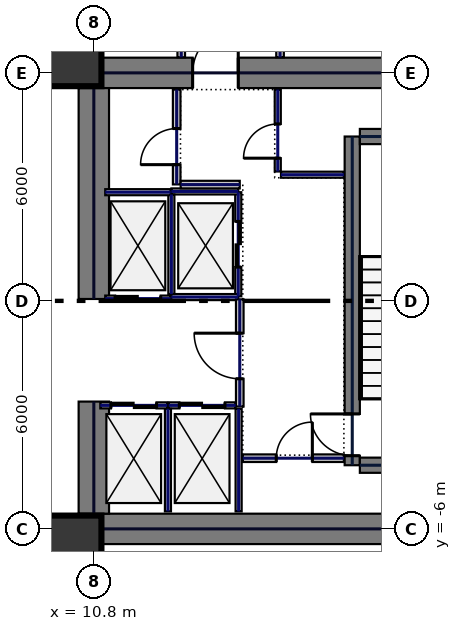
"""IFC4 building model, lengths in metres.
Left out: names, types, materials, properties, quantities, classifications, styles, units other than length and angle.
Written with IfcOpenShell. Run it as: python <this file> out.ifc"""

import sys

from ifc_helpers import new_model, si_unit, direction, frame, frame_2d, origin, origin_2d, place, context, subcontext, project, spatial, rectangle, hollow_circle, extrude, element, fill, save


model = new_model("IFC4")
c1 = context("Model", 3, precision=1e-05, world=origin(), true_north=direction((0.0, 1.0)))
c2 = subcontext(c1, "Body", "Model", "MODEL_VIEW")
j1 = project(units=[si_unit("LENGTHUNIT", "METRE"), si_unit("PLANEANGLEUNIT", "RADIAN")], contexts=[c1])
p1 = place(None, origin())
s1 = spatial("IfcSite", under=j1, at=p1, CompositionType="ELEMENT")
p2 = place(p1, origin())
s2 = spatial("IfcBuilding", under=s1, at=p2, CompositionType="ELEMENT")
p3 = place(p2, origin())
s3 = spatial("IfcBuildingStorey", under=s2, at=p3, CompositionType="ELEMENT", Elevation=0.0)
p4 = place(p3, frame((10.4, 6.0, 0.0), z_axis=(0.0, 0.0, 1.0), x_axis=(1.0, 0.0, 0.0)))
e1 = element("IfcWall", 1, at=p4, inside=s3, PredefinedType="SHEAR", context=c2, shape_type="SweptSolid", body=[
    extrude(rectangle(XDim=11.6, YDim=0.8, at=frame_2d((5.8, 0.0))), origin(), (0.0, 0.0, 1.0), 8.1),
])
p5 = place(p4, frame((3.0, 0.0, 0.0)))
e2 = element("IfcOpeningElement", 2, at=p5, cuts=e1, PredefinedType="OPENING", context=c2, shape_type="SweptSolid", body=[
    extrude(rectangle(XDim=1.2, YDim=2.2, at=frame_2d((0.6, 1.1))), frame((0.0, 0.41, 0.0), z_axis=(0.0, -1.0, 0.0), x_axis=(1.0, 0.0, 0.0)), (0.0, 0.0, 1.0), 0.82),
])
p6 = place(p3, frame((10.4, -6.0, 0.0), z_axis=(0.0, 0.0, 1.0), x_axis=(1.0, 0.0, 0.0)))
e3 = element("IfcWall", 3, at=p6, inside=s3, PredefinedType="SHEAR", context=c2, shape_type="SweptSolid", body=[
    extrude(rectangle(XDim=11.6, YDim=0.8, at=frame_2d((5.8, 0.0))), origin(), (0.0, 0.0, 1.0), 8.1),
])
p7 = place(p3, frame((10.8, -5.6, 0.0), z_axis=(0.0, 0.0, 1.0), x_axis=(0.0, 1.0, 0.0)))
e4 = element("IfcWall", 4, at=p7, inside=s3, PredefinedType="SHEAR", context=c2, shape_type="SweptSolid", body=[
    extrude(rectangle(XDim=2.95, YDim=0.8, at=frame_2d((1.475, 0.0))), origin(), (0.0, 0.0, 1.0), 8.1),
])
p8 = place(p3, frame((10.8, 0.05, 0.0), z_axis=(0.0, 0.0, 1.0), x_axis=(0.0, 1.0, 0.0)))
e5 = element("IfcWall", 5, at=p8, inside=s3, PredefinedType="SHEAR", context=c2, shape_type="SweptSolid", body=[
    extrude(rectangle(XDim=5.55, YDim=0.8, at=frame_2d((2.775, 0.0))), origin(), (0.0, 0.0, 1.0), 8.1),
])
p9 = place(p3, frame((17.6, -4.325, 0.0), z_axis=(0.0, 0.0, 1.0), x_axis=(0.0, 1.0, 0.0)))
e6 = element("IfcWall", 6, at=p9, inside=s3, PredefinedType="SHEAR", context=c2, shape_type="SweptSolid", body=[
    extrude(rectangle(XDim=8.65, YDim=0.4, at=frame_2d((4.325, 0.0))), origin(), (0.0, 0.0, 1.0), 8.1),
])
p10 = place(p9, frame((0.25, 0.0, 0.0)))
e7 = element("IfcOpeningElement", 7, at=p10, cuts=e6, PredefinedType="OPENING", context=c2, shape_type="SweptSolid", body=[
    extrude(rectangle(XDim=1.1, YDim=2.2, at=frame_2d((0.55, 1.1))), frame((0.0, 0.21, 0.0), z_axis=(0.0, -1.0, 0.0), x_axis=(1.0, 0.0, 0.0)), (0.0, 0.0, 1.0), 0.42),
])
for number, where, z_axis, x_axis in (
    (8, (17.8, -4.325, 0.0), (0.0, 0.0, 1.0), (1.0, 0.0, 0.0)),
    (9, (17.8, 4.325, 0.0), (0.0, 0.0, 1.0), (1.0, 0.0, 0.0)),
):
    element("IfcWall", number, at=place(p3, frame(where, z_axis=z_axis, x_axis=x_axis)), inside=s3, PredefinedType="SHEAR", context=c2, shape_type="SweptSolid", body=[
        extrude(rectangle(XDim=3.4, YDim=0.4, at=frame_2d((1.7, 0.0))), origin(), (0.0, 0.0, 1.0), 8.1),
    ])
for number, where, z_axis, x_axis in (
    (10, (10.3, -6.35, 0.0), (0.0, 0.0, 1.0), (1.0, 0.0, 0.0)),
    (11, (10.3, 6.35, 0.0), (0.0, 0.0, 1.0), (1.0, 0.0, 0.0)),
):
    element("IfcColumn", number, at=place(p3, frame(where, z_axis=z_axis, x_axis=x_axis)), inside=s3, PredefinedType="COLUMN", context=c2, shape_type="SweptSolid", body=[
        extrude(hollow_circle(Radius=0.7, WallThickness=0.05, at=origin_2d()), origin(), (0.0, 0.0, 1.0), 8.1),
    ])
p11 = place(p3, frame((14.6, 0.12, 0.0), z_axis=(0.0, 0.0, 1.0), x_axis=(0.0, 1.0, 0.0)))
e12 = element("IfcWall", 12, at=p11, inside=s3, PredefinedType="PARTITIONING", context=c2, shape_type="SweptSolid", body=[
    extrude(rectangle(XDim=2.74, YDim=0.16, at=frame_2d((1.37, 0.0))), origin(), (0.0, 0.0, 1.0), 8.1),
])
p12 = place(p11, frame((0.77, 0.0, 0.0)))
e13 = element("IfcOpeningElement", 13, at=p12, cuts=e12, PredefinedType="OPENING", context=c2, shape_type="SweptSolid", body=[
    extrude(rectangle(XDim=1.2, YDim=2.2, at=frame_2d((0.6, 1.1))), frame((0.0, 0.09, 0.0), z_axis=(0.0, -1.0, 0.0), x_axis=(1.0, 0.0, 0.0)), (0.0, 0.0, 1.0), 0.18),
])
for number, where, z_axis, x_axis in (
    (14, (12.84, 0.1, 0.0), (0.0, 0.0, 1.0), (1.0, 0.0, 0.0)),
    (15, (12.84, 2.88, 0.0), (0.0, 0.0, 1.0), (1.0, 0.0, 0.0)),
):
    element("IfcWall", number, at=place(p3, frame(where, z_axis=z_axis, x_axis=x_axis)), inside=s3, PredefinedType="PARTITIONING", context=c2, shape_type="SweptSolid", body=[
        extrude(rectangle(XDim=1.76, YDim=0.16, at=frame_2d((0.88, 0.0))), origin(), (0.0, 0.0, 1.0), 8.1),
    ])
p13 = place(p3, frame((12.84, 0.18, 0.0), z_axis=(0.0, 0.0, 1.0), x_axis=(0.0, 1.0, 0.0)))
e16 = element("IfcWall", 16, at=p13, inside=s3, PredefinedType="PARTITIONING", context=c2, shape_type="SweptSolid", body=[
    extrude(rectangle(XDim=2.62, YDim=0.16, at=frame_2d((1.31, 0.0))), origin(), (0.0, 0.0, 1.0), 8.1),
])
p14 = place(p3, frame((12.77, -2.75, 0.0), z_axis=(0.0, 0.0, 1.0), x_axis=(1.0, 0.0, 0.0)))
e17 = element("IfcWall", 17, at=p14, inside=s3, PredefinedType="PARTITIONING", context=c2, shape_type="SweptSolid", body=[
    extrude(rectangle(XDim=1.76, YDim=0.16, at=frame_2d((0.88, 0.0))), origin(), (0.0, 0.0, 1.0), 8.1),
])
p15 = place(p14, frame((0.28, 0.0, 0.0)))
e18 = element("IfcOpeningElement", 18, at=p15, cuts=e17, PredefinedType="OPENING", context=c2, shape_type="SweptSolid", body=[
    extrude(rectangle(XDim=1.2, YDim=2.2, at=frame_2d((0.6, 1.1))), frame((0.0, 0.09, 0.0), z_axis=(0.0, -1.0, 0.0), x_axis=(1.0, 0.0, 0.0)), (0.0, 0.0, 1.0), 0.18),
])
for number, where, z_axis, x_axis in (
    (19, (12.75, -5.54, 0.0), (0.0, 0.0, 1.0), (0.0, 1.0, 0.0)),
    (20, (14.61, -5.54, 0.0), (0.0, 0.0, 1.0), (0.0, 1.0, 0.0)),
):
    element("IfcWall", number, at=place(p3, frame(where, z_axis=z_axis, x_axis=x_axis)), inside=s3, PredefinedType="PARTITIONING", context=c2, shape_type="SweptSolid", body=[
        extrude(rectangle(XDim=2.7, YDim=0.16, at=frame_2d((1.35, 0.0))), origin(), (0.0, 0.0, 1.0), 8.1),
    ])
p16 = place(p3, frame((10.97, -2.75, 0.0), z_axis=(0.0, 0.0, 1.0), x_axis=(1.0, 0.0, 0.0)))
e21 = element("IfcWall", 21, at=p16, inside=s3, PredefinedType="PARTITIONING", context=c2, shape_type="SweptSolid", body=[
    extrude(rectangle(XDim=1.76, YDim=0.16, at=frame_2d((0.88, 0.0))), origin(), (0.0, 0.0, 1.0), 8.1),
])
p17 = place(p16, frame((0.28, 0.0, 0.0)))
e22 = element("IfcOpeningElement", 22, at=p17, cuts=e21, PredefinedType="OPENING", context=c2, shape_type="SweptSolid", body=[
    extrude(rectangle(XDim=1.2, YDim=2.2, at=frame_2d((0.6, 1.1))), frame((0.0, 0.09, 0.0), z_axis=(0.0, -1.0, 0.0), x_axis=(1.0, 0.0, 0.0)), (0.0, 0.0, 1.0), 0.18),
])
p18 = place(p3, frame((11.1, 0.06, 0.0), z_axis=(0.0, 0.0, 1.0), x_axis=(1.0, 0.0, 0.0)))
e23 = element("IfcWall", 23, at=p18, inside=s3, PredefinedType="PARTITIONING", context=c2, shape_type="SweptSolid", body=[
    extrude(rectangle(XDim=1.72, YDim=0.16, at=frame_2d((0.86, 0.0))), origin(), (0.0, 0.0, 1.0), 8.1),
])
p19 = place(p18, frame((0.26, 0.0, 0.0)))
e24 = element("IfcOpeningElement", 24, at=p19, cuts=e23, PredefinedType="OPENING", context=c2, shape_type="SweptSolid", body=[
    extrude(rectangle(XDim=1.2, YDim=2.2, at=frame_2d((0.6, 1.1))), frame((0.0, 0.09, 0.0), z_axis=(0.0, -1.0, 0.0), x_axis=(1.0, 0.0, 0.0)), (0.0, 0.0, 1.0), 0.18),
])
p20 = place(p3, frame((11.1, 2.86, 0.0), z_axis=(0.0, 0.0, 1.0), x_axis=(1.0, 0.0, 0.0)))
e25 = element("IfcWall", 25, at=p20, inside=s3, PredefinedType="PARTITIONING", context=c2, shape_type="SweptSolid", body=[
    extrude(rectangle(XDim=1.72, YDim=0.16, at=frame_2d((0.86, 0.0))), origin(), (0.0, 0.0, 1.0), 8.1),
])
p21 = place(p3, frame((15.64, 3.405, 0.0), z_axis=(0.0, 0.0, 1.0), x_axis=(0.0, 1.0, 0.0)))
e26 = element("IfcWall", 26, at=p21, inside=s3, PredefinedType="PARTITIONING", context=c2, shape_type="SweptSolid", body=[
    extrude(rectangle(XDim=2.155, YDim=0.16, at=frame_2d((1.078, 0.0))), origin(), (0.0, 0.0, 1.0), 8.1),
])
p22 = place(p21, frame((0.35, 0.0, 0.0)))
e27 = element("IfcOpeningElement", 27, at=p22, cuts=e26, PredefinedType="OPENING", context=c2, shape_type="SweptSolid", body=[
    extrude(rectangle(XDim=0.9, YDim=2.2, at=frame_2d((0.45, 1.1))), frame((0.0, 0.09, 0.0), z_axis=(0.0, -1.0, 0.0), x_axis=(1.0, 0.0, 0.0)), (0.0, 0.0, 1.0), 0.18),
])
p23 = place(p3, frame((15.725, 3.32, 0.0), z_axis=(0.0, 0.0, 1.0), x_axis=(1.0, 0.0, 0.0)))
e28 = element("IfcWall", 28, at=p23, inside=s3, PredefinedType="PARTITIONING", context=c2, shape_type="SweptSolid", body=[
    extrude(rectangle(XDim=1.655, YDim=0.16, at=frame_2d((0.827, 0.0))), origin(), (0.0, 0.0, 1.0), 8.1),
])
p24 = place(p3, frame((14.72, -4.14, 0.0), z_axis=(0.0, 0.0, 1.0), x_axis=(1.0, 0.0, 0.0)))
e29 = element("IfcWall", 29, at=p24, inside=s3, PredefinedType="SOLIDWALL", context=c2, shape_type="SweptSolid", body=[
    extrude(rectangle(XDim=2.66, YDim=0.2, at=frame_2d((1.33, 0.0))), origin(), (0.0, 0.0, 1.0), 8.1),
])
p25 = place(p24, frame((0.88, 0.0, 0.0)))
e30 = element("IfcOpeningElement", 30, at=p25, cuts=e29, PredefinedType="OPENING", context=c2, shape_type="SweptSolid", body=[
    extrude(rectangle(XDim=0.95, YDim=2.2, at=frame_2d((0.475, 1.1))), frame((0.0, 0.11, 0.0), z_axis=(0.0, -1.0, 0.0), x_axis=(1.0, 0.0, 0.0)), (0.0, 0.0, 1.0), 0.22),
])
p26 = place(p3, frame((12.98, 3.065, 0.0), z_axis=(0.0, 0.0, 1.0), x_axis=(0.0, 1.0, 0.0)))
e31 = element("IfcWall", 31, at=p26, inside=s3, PredefinedType="SOLIDWALL", context=c2, shape_type="SweptSolid", body=[
    extrude(rectangle(XDim=2.495, YDim=0.2, at=frame_2d((1.248, 0.0))), origin(), (0.0, 0.0, 1.0), 8.1),
])
p27 = place(p26, frame((0.52, 0.0, 0.0)))
e32 = element("IfcOpeningElement", 32, at=p27, cuts=e31, PredefinedType="OPENING", context=c2, shape_type="SweptSolid", body=[
    extrude(rectangle(XDim=0.95, YDim=2.2, at=frame_2d((0.475, 1.1))), frame((0.0, 0.11, 0.0), z_axis=(0.0, -1.0, 0.0), x_axis=(1.0, 0.0, 0.0)), (0.0, 0.0, 1.0), 0.22),
])
p28 = place(p3, frame((13.085, 3.06, 0.0), z_axis=(0.0, 0.0, 1.0), x_axis=(1.0, 0.0, 0.0)))
e33 = element("IfcWall", 33, at=p28, inside=s3, PredefinedType="SOLIDWALL", context=c2, shape_type="SweptSolid", body=[
    extrude(rectangle(XDim=1.555, YDim=0.2, at=frame_2d((0.777, 0.0))), origin(), (0.0, 0.0, 1.0), 8.1),
])
p29 = place(p3, frame((14.64, -2.78, 0.0), z_axis=(0.0, 0.0, 1.0), x_axis=(0.0, 1.0, 0.0)))
e34 = element("IfcWall", 34, at=p29, inside=s3, PredefinedType="SOLIDWALL", context=c2, shape_type="SweptSolid", body=[
    extrude(rectangle(XDim=2.82, YDim=0.2, at=frame_2d((1.41, 0.0))), origin(), (0.0, 0.0, 1.0), 8.1),
])
p30 = place(p29, frame((0.73, 0.0, 0.0)))
e35 = element("IfcOpeningElement", 35, at=p30, cuts=e34, PredefinedType="OPENING", context=c2, shape_type="SweptSolid", body=[
    extrude(rectangle(XDim=1.2, YDim=2.2, at=frame_2d((0.6, 1.1))), frame((0.0, 0.11, 0.0), z_axis=(0.0, -1.0, 0.0), x_axis=(1.0, 0.0, 0.0)), (0.0, 0.0, 1.0), 0.22),
])
for number, where, z_axis, x_axis in (
    (36, (13.1, 6.41, 0.0), (0.0, 0.0, 1.0), (0.0, 1.0, 0.0)),
    (37, (15.7, 6.41, 0.0), (0.0, 0.0, 1.0), (0.0, 1.0, 0.0)),
):
    element("IfcWall", number, at=place(p3, frame(where, z_axis=z_axis, x_axis=x_axis)), inside=s3, PredefinedType="SOLIDWALL", context=c2, shape_type="SweptSolid", body=[
        extrude(rectangle(XDim=23.41, YDim=0.2, at=frame_2d((11.705, 0.0))), origin(), (0.0, 0.0, 1.0), 8.1),
    ])
p31 = place(p5, origin())
e38 = element("IfcDoor", 38, at=p31, inside=s3, OperationType="SINGLE_SWING_RIGHT", PredefinedType="DOOR", context=c2, shape_type="SweptSolid", body=[
    extrude(rectangle(XDim=1.2, YDim=2.2, at=frame_2d((0.6, 1.1))), frame((0.0, 0.025, 0.0), z_axis=(0.0, -1.0, 0.0), x_axis=(1.0, 0.0, 0.0)), (0.0, 0.0, 1.0), 0.05),
])
fill(e2, e38)
p32 = place(p10, origin())
e39 = element("IfcDoor", 39, at=p32, inside=s3, OperationType="SINGLE_SWING_RIGHT", PredefinedType="DOOR", context=c2, shape_type="SweptSolid", body=[
    extrude(rectangle(XDim=1.1, YDim=2.2, at=frame_2d((0.55, 1.1))), frame((0.0, 0.025, 0.0), z_axis=(0.0, -1.0, 0.0), x_axis=(1.0, 0.0, 0.0)), (0.0, 0.0, 1.0), 0.05),
])
fill(e7, e39)
p33 = place(p12, origin())
e40 = element("IfcDoor", 40, at=p33, inside=s3, OperationType="SLIDING_TO_LEFT", PredefinedType="DOOR", context=c2, shape_type="SweptSolid", body=[
    extrude(rectangle(XDim=1.2, YDim=2.2, at=frame_2d((0.6, 1.1))), frame((0.0, 0.025, 0.0), z_axis=(0.0, -1.0, 0.0), x_axis=(1.0, 0.0, 0.0)), (0.0, 0.0, 1.0), 0.05),
])
fill(e13, e40)
p34 = place(p15, origin())
e41 = element("IfcDoor", 41, at=p34, inside=s3, OperationType="SLIDING_TO_LEFT", PredefinedType="DOOR", context=c2, shape_type="SweptSolid", body=[
    extrude(rectangle(XDim=1.2, YDim=2.2, at=frame_2d((0.6, 1.1))), frame((0.0, 0.025, 0.0), z_axis=(0.0, -1.0, 0.0), x_axis=(1.0, 0.0, 0.0)), (0.0, 0.0, 1.0), 0.05),
])
fill(e18, e41)
p35 = place(p17, origin())
e42 = element("IfcDoor", 42, at=p35, inside=s3, OperationType="SLIDING_TO_LEFT", PredefinedType="DOOR", context=c2, shape_type="SweptSolid", body=[
    extrude(rectangle(XDim=1.2, YDim=2.2, at=frame_2d((0.6, 1.1))), frame((0.0, 0.025, 0.0), z_axis=(0.0, -1.0, 0.0), x_axis=(1.0, 0.0, 0.0)), (0.0, 0.0, 1.0), 0.05),
])
fill(e22, e42)
p36 = place(p19, origin())
e43 = element("IfcDoor", 43, at=p36, inside=s3, OperationType="SLIDING_TO_LEFT", PredefinedType="DOOR", context=c2, shape_type="SweptSolid", body=[
    extrude(rectangle(XDim=1.2, YDim=2.2, at=frame_2d((0.6, 1.1))), frame((0.0, 0.025, 0.0), z_axis=(0.0, -1.0, 0.0), x_axis=(1.0, 0.0, 0.0)), (0.0, 0.0, 1.0), 0.05),
])
fill(e24, e43)
p37 = place(p22, origin())
e44 = element("IfcDoor", 44, at=p37, inside=s3, OperationType="SINGLE_SWING_LEFT", PredefinedType="DOOR", context=c2, shape_type="SweptSolid", body=[
    extrude(rectangle(XDim=0.9, YDim=2.2, at=frame_2d((0.45, 1.1))), frame((0.0, 0.025, 0.0), z_axis=(0.0, -1.0, 0.0), x_axis=(1.0, 0.0, 0.0)), (0.0, 0.0, 1.0), 0.05),
])
fill(e27, e44)
p38 = place(p25, origin())
e45 = element("IfcDoor", 45, at=p38, inside=s3, OperationType="SINGLE_SWING_RIGHT", PredefinedType="DOOR", context=c2, shape_type="SweptSolid", body=[
    extrude(rectangle(XDim=0.95, YDim=2.2, at=frame_2d((0.475, 1.1))), frame((0.0, 0.025, 0.0), z_axis=(0.0, -1.0, 0.0), x_axis=(1.0, 0.0, 0.0)), (0.0, 0.0, 1.0), 0.05),
])
fill(e30, e45)
p39 = place(p27, origin())
e46 = element("IfcDoor", 46, at=p39, inside=s3, OperationType="SINGLE_SWING_LEFT", PredefinedType="DOOR", context=c2, shape_type="SweptSolid", body=[
    extrude(rectangle(XDim=0.95, YDim=2.2, at=frame_2d((0.475, 1.1))), frame((0.0, 0.025, 0.0), z_axis=(0.0, -1.0, 0.0), x_axis=(1.0, 0.0, 0.0)), (0.0, 0.0, 1.0), 0.05),
])
fill(e32, e46)
p40 = place(p30, origin())
e47 = element("IfcDoor", 47, at=p40, inside=s3, OperationType="SINGLE_SWING_RIGHT", PredefinedType="DOOR", context=c2, shape_type="SweptSolid", body=[
    extrude(rectangle(XDim=1.2, YDim=2.2, at=frame_2d((0.6, 1.1))), frame((0.0, 0.025, 0.0), z_axis=(0.0, -1.0, 0.0), x_axis=(1.0, 0.0, 0.0)), (0.0, 0.0, 1.0), 0.05),
])
fill(e35, e47)
save(model, sys.argv[1])
